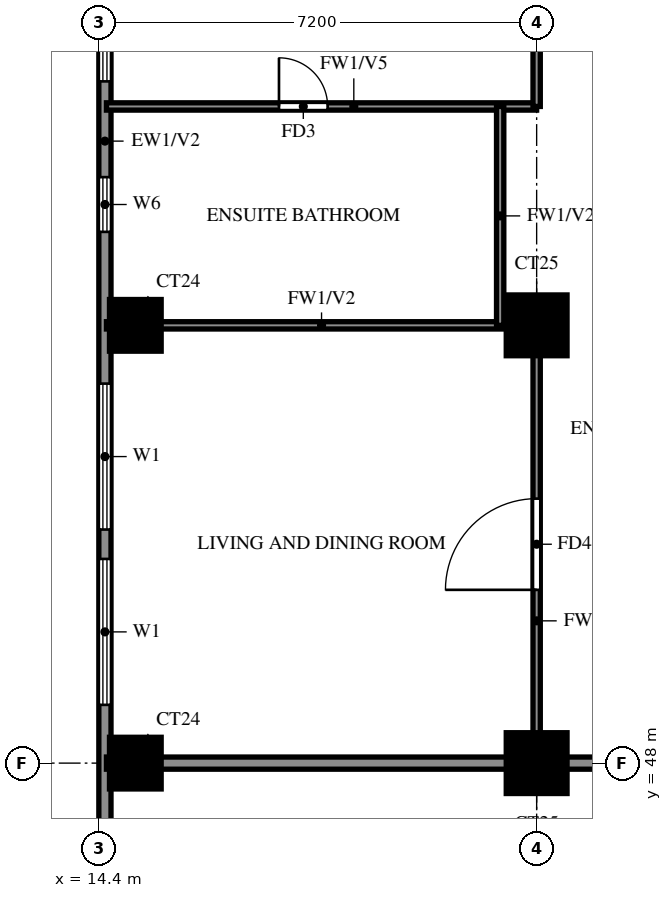
"""IFC4 building model, lengths in metres.
Left out: names, types, materials, properties, quantities, classifications, styles, units other than length and angle.
Written with IfcOpenShell. Run it as: python <this file> out.ifc"""

import sys

from ifc_helpers import new_model, si_unit, direction, frame, frame_2d, origin, origin_2d, place, context, subcontext, project, spatial, rectangle, extrude, source, transform, mapped, element, fill, save


model = new_model("IFC4")
c1 = context("Model", 3, precision=1e-05, world=origin(), true_north=direction((0.0, 1.0)))
c2 = subcontext(c1, "Body", "Model", "MODEL_VIEW")
j1 = project(units=[si_unit("LENGTHUNIT", "METRE"), si_unit("PLANEANGLEUNIT", "RADIAN")], contexts=[c1])
p1 = place(None, origin())
s1 = spatial("IfcSite", under=j1, at=p1, CompositionType="ELEMENT")
p2 = place(p1, origin())
s2 = spatial("IfcBuilding", under=s1, at=p2, CompositionType="ELEMENT")
p3 = place(p2, frame((0.0, 0.0, 146.5)))
s3 = spatial("IfcBuildingStorey", under=s2, at=p3, CompositionType="ELEMENT", Elevation=146.5)
m1 = source(origin(), c2, "Body", "SweptSolid", [
    extrude(rectangle(XDim=0.85, YDim=0.85, at=origin_2d()), origin(), (0.0, 0.0, 1.0), 3.2),
])
p4 = place(p3, frame((15.0, 48.0, 0.0), z_axis=(0.0, 0.0, 1.0), x_axis=(1.0, 0.0, 0.0)))
e1 = element("IfcColumn", 1, at=p4, inside=s3, PredefinedType="COLUMN", context=c2, shape_type="MappedRepresentation", body=[
    mapped(m1, transform((0.0, 0.0, 0.0))),
])
m2 = source(origin(), c2, "Body", "SweptSolid", [
    extrude(rectangle(XDim=1.0, YDim=1.0, at=origin_2d()), origin(), (0.0, 0.0, 1.0), 3.2),
])
p5 = place(p3, frame((21.6, 48.0, 0.0), z_axis=(0.0, 0.0, 1.0), x_axis=(1.0, 0.0, 0.0)))
e2 = element("IfcColumn", 2, at=p5, inside=s3, PredefinedType="COLUMN", context=c2, shape_type="MappedRepresentation", body=[
    mapped(m2, transform((0.0, 0.0, 0.0))),
])
p6 = place(p3, frame((15.0, 55.2, 0.0), z_axis=(0.0, 0.0, 1.0), x_axis=(1.0, 0.0, 0.0)))
e3 = element("IfcColumn", 3, at=p6, inside=s3, PredefinedType="COLUMN", context=c2, shape_type="MappedRepresentation", body=[
    mapped(m1, transform((0.0, 0.0, 0.0))),
])
p7 = place(p3, frame((21.6, 55.2, 0.0), z_axis=(0.0, 0.0, 1.0), x_axis=(1.0, 0.0, 0.0)))
e4 = element("IfcColumn", 4, at=p7, inside=s3, PredefinedType="COLUMN", context=c2, shape_type="MappedRepresentation", body=[
    mapped(m2, transform((0.0, 0.0, 0.0))),
])
p8 = place(p3, frame((14.5, 76.6, 0.0), z_axis=(0.0, 0.0, 1.0), x_axis=(0.0, -1.0, 0.0)))
e5 = element("IfcWall", 5, at=p8, inside=s3, PredefinedType="SOLIDWALL", context=c2, shape_type="SweptSolid", body=[
    extrude(rectangle(XDim=33.4, YDim=0.2, at=frame_2d((16.7, 0.0))), origin(), (0.0, 0.0, 1.0), 3.2),
])
p9 = place(p8, frame((29.887, 0.0, 0.6)))
e6 = element("IfcOpeningElement", 6, at=p9, cuts=e5, PredefinedType="OPENING", context=c2, shape_type="SweptSolid", body=[
    extrude(rectangle(XDim=2.4, YDim=2.4, at=frame_2d((1.2, 1.2))), frame((0.0, 0.11, 0.0), z_axis=(0.0, -1.0, 0.0), x_axis=(1.0, 0.0, 0.0)), (0.0, 0.0, 1.0), 0.22),
])
p10 = place(p8, frame((22.358, 0.0, 0.6)))
e7 = element("IfcOpeningElement", 7, at=p10, cuts=e5, PredefinedType="OPENING", context=c2, shape_type="SweptSolid", body=[
    extrude(rectangle(XDim=2.4, YDim=2.4, at=frame_2d((1.2, 1.2))), frame((0.0, 0.11, 0.0), z_axis=(0.0, -1.0, 0.0), x_axis=(1.0, 0.0, 0.0)), (0.0, 0.0, 1.0), 0.22),
])
p11 = place(p8, frame((25.242, 0.0, 0.6)))
e8 = element("IfcOpeningElement", 8, at=p11, cuts=e5, PredefinedType="OPENING", context=c2, shape_type="SweptSolid", body=[
    extrude(rectangle(XDim=2.4, YDim=2.4, at=frame_2d((1.2, 1.2))), frame((0.0, 0.11, 0.0), z_axis=(0.0, -1.0, 0.0), x_axis=(1.0, 0.0, 0.0)), (0.0, 0.0, 1.0), 0.22),
])
p12 = place(p8, frame((14.988, 0.0, 0.6)))
e9 = element("IfcOpeningElement", 9, at=p12, cuts=e5, PredefinedType="OPENING", context=c2, shape_type="SweptSolid", body=[
    extrude(rectangle(XDim=2.4, YDim=2.4, at=frame_2d((1.2, 1.2))), frame((0.0, 0.11, 0.0), z_axis=(0.0, -1.0, 0.0), x_axis=(1.0, 0.0, 0.0)), (0.0, 0.0, 1.0), 0.22),
])
p13 = place(p8, frame((18.962, 0.0, 1.5)))
e10 = element("IfcOpeningElement", 10, at=p13, cuts=e5, PredefinedType="OPENING", context=c2, shape_type="SweptSolid", body=[
    extrude(rectangle(XDim=0.9, YDim=0.9, at=frame_2d((0.45, 0.45))), frame((0.0, 0.11, 0.0), z_axis=(0.0, -1.0, 0.0), x_axis=(1.0, 0.0, 0.0)), (0.0, 0.0, 1.0), 0.22),
])
p14 = place(p8, frame((11.012, 0.0, 0.6)))
e11 = element("IfcOpeningElement", 11, at=p14, cuts=e5, PredefinedType="OPENING", context=c2, shape_type="SweptSolid", body=[
    extrude(rectangle(XDim=2.4, YDim=2.4, at=frame_2d((1.2, 1.2))), frame((0.0, 0.11, 0.0), z_axis=(0.0, -1.0, 0.0), x_axis=(1.0, 0.0, 0.0)), (0.0, 0.0, 1.0), 0.22),
])
p15 = place(p8, frame((7.788, 0.0, 0.6)))
e12 = element("IfcOpeningElement", 12, at=p15, cuts=e5, PredefinedType="OPENING", context=c2, shape_type="SweptSolid", body=[
    extrude(rectangle(XDim=2.4, YDim=2.4, at=frame_2d((1.2, 1.2))), frame((0.0, 0.11, 0.0), z_axis=(0.0, -1.0, 0.0), x_axis=(1.0, 0.0, 0.0)), (0.0, 0.0, 1.0), 0.22),
])
p16 = place(p8, frame((4.562, 0.0, 1.5)))
e13 = element("IfcOpeningElement", 13, at=p16, cuts=e5, PredefinedType="OPENING", context=c2, shape_type="SweptSolid", body=[
    extrude(rectangle(XDim=0.9, YDim=0.9, at=frame_2d((0.45, 0.45))), frame((0.0, 0.11, 0.0), z_axis=(0.0, -1.0, 0.0), x_axis=(1.0, 0.0, 0.0)), (0.0, 0.0, 1.0), 0.22),
])
p17 = place(p8, frame((0.6, 0.0, 0.6)))
e14 = element("IfcOpeningElement", 14, at=p17, cuts=e5, PredefinedType="OPENING", context=c2, shape_type="SweptSolid", body=[
    extrude(rectangle(XDim=2.4, YDim=2.4, at=frame_2d((1.2, 1.2))), frame((0.0, 0.11, 0.0), z_axis=(0.0, -1.0, 0.0), x_axis=(1.0, 0.0, 0.0)), (0.0, 0.0, 1.0), 0.22),
])
p18 = place(p3, frame((14.525, 48.0, 0.0), z_axis=(0.0, 0.0, 1.0), x_axis=(1.0, 0.0, 0.0)))
e15 = element("IfcWall", 15, at=p18, inside=s3, PredefinedType="SOLIDWALL", context=c2, shape_type="SweptSolid", body=[
    extrude(rectangle(XDim=19.075, YDim=0.2, at=frame_2d((9.538, 0.0))), origin(), (0.0, 0.0, 1.0), 3.2),
])
p19 = place(p3, frame((14.525, 55.2, 0.0), z_axis=(0.0, 0.0, 1.0), x_axis=(1.0, 0.0, 0.0)))
e16 = element("IfcWall", 16, at=p19, inside=s3, PredefinedType="PARTITIONING", context=c2, shape_type="SweptSolid", body=[
    extrude(rectangle(XDim=7.075, YDim=0.12, at=frame_2d((3.538, 0.0))), origin(), (0.0, 0.0, 1.0), 3.2),
])
p20 = place(p3, frame((14.525, 58.8, 0.0), z_axis=(0.0, 0.0, 1.0), x_axis=(1.0, 0.0, 0.0)))
e17 = element("IfcWall", 17, at=p20, inside=s3, PredefinedType="PARTITIONING", context=c2, shape_type="SweptSolid", body=[
    extrude(rectangle(XDim=7.075, YDim=0.12, at=frame_2d((3.538, 0.0))), origin(), (0.0, 0.0, 1.0), 2.3),
])
p21 = place(p20, frame((2.837, 0.0, 0.0)))
e18 = element("IfcOpeningElement", 18, at=p21, cuts=e17, PredefinedType="OPENING", context=c2, shape_type="SweptSolid", body=[
    extrude(rectangle(XDim=0.8, YDim=2.1, at=frame_2d((0.4, 1.05))), frame((0.0, 0.07, 0.0), z_axis=(0.0, -1.0, 0.0), x_axis=(1.0, 0.0, 0.0)), (0.0, 0.0, 1.0), 0.14),
])
p22 = place(p3, frame((21.0, 55.2, 0.0), z_axis=(0.0, 0.0, 1.0), x_axis=(0.0, 1.0, 0.0)))
e19 = element("IfcWall", 19, at=p22, inside=s3, PredefinedType="PARTITIONING", context=c2, shape_type="SweptSolid", body=[
    extrude(rectangle(XDim=3.6, YDim=0.12, at=frame_2d((1.8, 0.0))), origin(), (0.0, 0.0, 1.0), 3.2),
])
p23 = place(p3, frame((21.6, 48.0, 0.0), z_axis=(0.0, 0.0, 1.0), x_axis=(0.0, 1.0, 0.0)))
e20 = element("IfcWall", 20, at=p23, inside=s3, PredefinedType="PARTITIONING", context=c2, shape_type="SweptSolid", body=[
    extrude(rectangle(XDim=7.2, YDim=0.12, at=frame_2d((3.6, 0.0))), origin(), (0.0, 0.0, 1.0), 3.2),
])
p24 = place(p23, frame((2.85, 0.0, 0.0)))
e21 = element("IfcOpeningElement", 21, at=p24, cuts=e20, PredefinedType="OPENING", context=c2, shape_type="SweptSolid", body=[
    extrude(rectangle(XDim=1.5, YDim=2.1, at=frame_2d((0.75, 1.05))), frame((0.0, 0.07, 0.0), z_axis=(0.0, -1.0, 0.0), x_axis=(1.0, 0.0, 0.0)), (0.0, 0.0, 1.0), 0.14),
])
p25 = place(p3, frame((21.6, 58.8, 0.0), z_axis=(0.0, 0.0, 1.0), x_axis=(0.0, 1.0, 0.0)))
e22 = element("IfcWall", 22, at=p25, inside=s3, PredefinedType="PARTITIONING", context=c2, shape_type="SweptSolid", body=[
    extrude(rectangle(XDim=10.8, YDim=0.12, at=frame_2d((5.4, 0.0))), origin(), (0.0, 0.0, 1.0), 3.2),
])
p26 = place(p25, frame((1.35, 0.0, 0.0)))
e23 = element("IfcOpeningElement", 23, at=p26, cuts=e22, PredefinedType="OPENING", context=c2, shape_type="SweptSolid", body=[
    extrude(rectangle(XDim=0.9, YDim=2.1, at=frame_2d((0.45, 1.05))), frame((0.0, 0.07, 0.0), z_axis=(0.0, -1.0, 0.0), x_axis=(1.0, 0.0, 0.0)), (0.0, 0.0, 1.0), 0.14),
])
p27 = place(p25, frame((4.95, 0.0, 0.0)))
e24 = element("IfcOpeningElement", 24, at=p27, cuts=e22, PredefinedType="OPENING", context=c2, shape_type="SweptSolid", body=[
    extrude(rectangle(XDim=0.9, YDim=2.1, at=frame_2d((0.45, 1.05))), frame((0.0, 0.07, 0.0), z_axis=(0.0, -1.0, 0.0), x_axis=(1.0, 0.0, 0.0)), (0.0, 0.0, 1.0), 0.14),
])
p28 = place(p25, frame((8.55, 0.0, 0.0)))
e25 = element("IfcOpeningElement", 25, at=p28, cuts=e22, PredefinedType="OPENING", context=c2, shape_type="SweptSolid", body=[
    extrude(rectangle(XDim=0.9, YDim=2.1, at=frame_2d((0.45, 1.05))), frame((0.0, 0.07, 0.0), z_axis=(0.0, -1.0, 0.0), x_axis=(1.0, 0.0, 0.0)), (0.0, 0.0, 1.0), 0.14),
])
p29 = place(p10, origin())
e26 = element("IfcWindow", 26, at=p29, inside=s3, PartitioningType="DOUBLE_PANEL_VERTICAL", PredefinedType="WINDOW", context=c2, shape_type="SweptSolid", body=[
    extrude(rectangle(XDim=2.4, YDim=2.4, at=frame_2d((1.2, 1.2))), frame((0.0, 0.03, 0.0), z_axis=(0.0, -1.0, 0.0), x_axis=(1.0, 0.0, 0.0)), (0.0, 0.0, 1.0), 0.06),
])
fill(e7, e26)
p30 = place(p11, origin())
e27 = element("IfcWindow", 27, at=p30, inside=s3, PartitioningType="DOUBLE_PANEL_VERTICAL", PredefinedType="WINDOW", context=c2, shape_type="SweptSolid", body=[
    extrude(rectangle(XDim=2.4, YDim=2.4, at=frame_2d((1.2, 1.2))), frame((0.0, 0.03, 0.0), z_axis=(0.0, -1.0, 0.0), x_axis=(1.0, 0.0, 0.0)), (0.0, 0.0, 1.0), 0.06),
])
fill(e8, e27)
p31 = place(p12, origin())
e28 = element("IfcWindow", 28, at=p31, inside=s3, PartitioningType="DOUBLE_PANEL_VERTICAL", PredefinedType="WINDOW", context=c2, shape_type="SweptSolid", body=[
    extrude(rectangle(XDim=2.4, YDim=2.4, at=frame_2d((1.2, 1.2))), frame((0.0, 0.03, 0.0), z_axis=(0.0, -1.0, 0.0), x_axis=(1.0, 0.0, 0.0)), (0.0, 0.0, 1.0), 0.06),
])
fill(e9, e28)
p32 = place(p13, origin())
e29 = element("IfcWindow", 29, at=p32, inside=s3, PartitioningType="SINGLE_PANEL", PredefinedType="WINDOW", context=c2, shape_type="SweptSolid", body=[
    extrude(rectangle(XDim=0.9, YDim=0.9, at=frame_2d((0.45, 0.45))), frame((0.0, 0.03, 0.0), z_axis=(0.0, -1.0, 0.0), x_axis=(1.0, 0.0, 0.0)), (0.0, 0.0, 1.0), 0.06),
])
fill(e10, e29)
p33 = place(p24, origin())
e30 = element("IfcDoor", 30, at=p33, inside=s3, OperationType="SINGLE_SWING_RIGHT", PredefinedType="DOOR", context=c2, shape_type="SweptSolid", body=[
    extrude(rectangle(XDim=1.5, YDim=2.1, at=frame_2d((0.75, 1.05))), frame((0.0, 0.025, 0.0), z_axis=(0.0, -1.0, 0.0), x_axis=(1.0, 0.0, 0.0)), (0.0, 0.0, 1.0), 0.05),
])
fill(e21, e30)
p34 = place(p21, origin())
e31 = element("IfcDoor", 31, at=p34, inside=s3, OperationType="SINGLE_SWING_LEFT", PredefinedType="DOOR", context=c2, shape_type="SweptSolid", body=[
    extrude(rectangle(XDim=0.8, YDim=2.1, at=frame_2d((0.4, 1.05))), frame((0.0, 0.025, 0.0), z_axis=(0.0, -1.0, 0.0), x_axis=(1.0, 0.0, 0.0)), (0.0, 0.0, 1.0), 0.05),
])
fill(e18, e31)
save(model, sys.argv[1])
